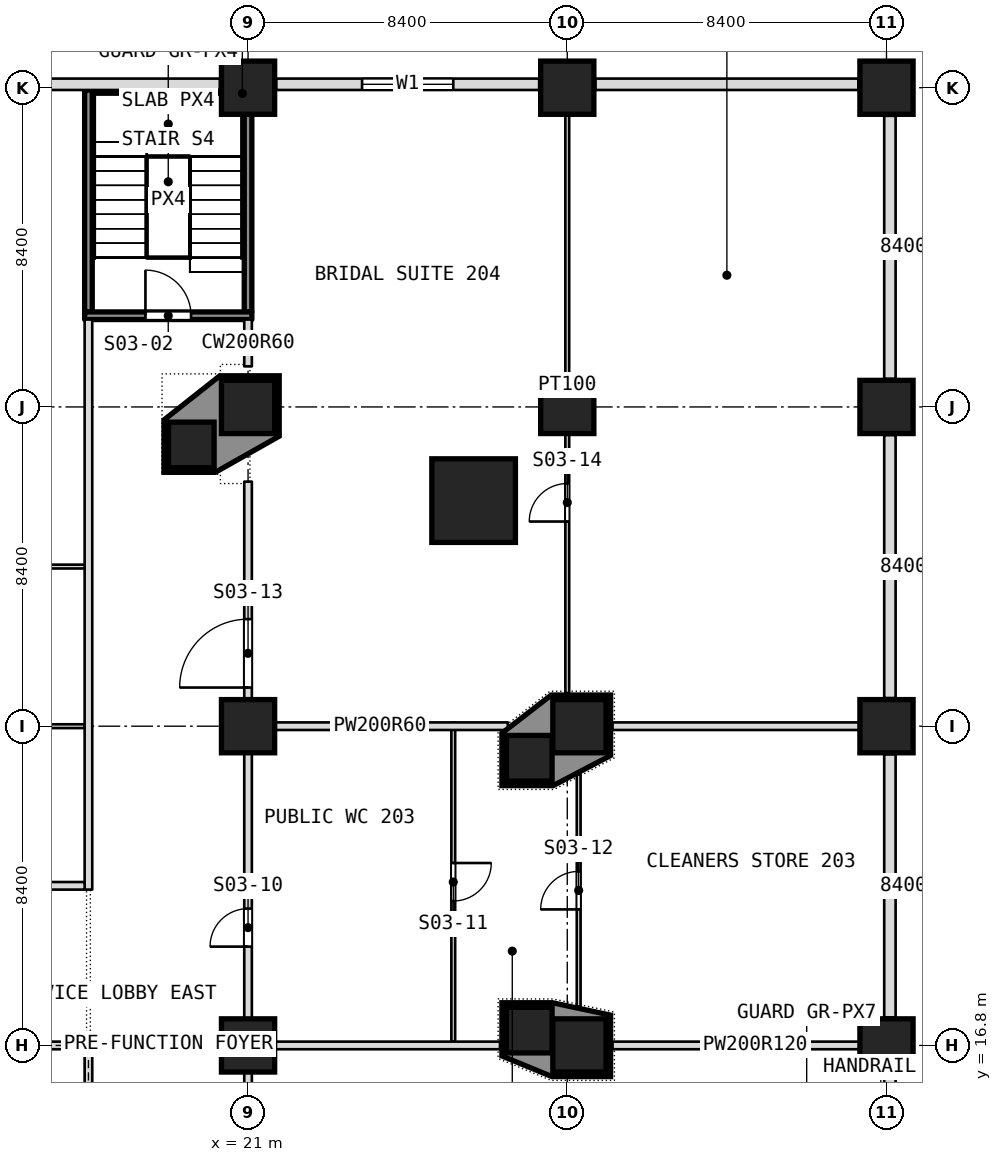
"""IFC4 building model, lengths in metres.
Left out: names, types, materials, properties, quantities, classifications, styles, units other than length and angle.
Written with IfcOpenShell. Run it as: python <this file> out.ifc"""

import sys

from ifc_helpers import new_model, si_unit, direction, frame, frame_2d, origin, origin_2d, place, context, subcontext, project, spatial, polyline, rectangle, outline, extrude, element, fill, save


model = new_model("IFC4")
c1 = context("Model", 3, precision=1e-05, world=origin(), true_north=direction((0.0, 1.0)))
c2 = subcontext(c1, "Body", "Model", "MODEL_VIEW")
j1 = project(units=[si_unit("LENGTHUNIT", "METRE"), si_unit("PLANEANGLEUNIT", "RADIAN")], contexts=[c1])
p1 = place(None, origin())
s1 = spatial("IfcSite", under=j1, at=p1, CompositionType="ELEMENT")
p2 = place(p1, origin())
s2 = spatial("IfcBuilding", under=s1, at=p2, CompositionType="ELEMENT")
p3 = place(p2, frame((0.0, 0.0, 13.0)))
s3 = spatial("IfcBuildingStorey", under=s2, at=p3, CompositionType="ELEMENT", Elevation=13.0)
for number, where, z_axis, x_axis in (
    (1, (21.0, 16.8, 0.0), (0.0, 0.0, 1.0), (1.0, 0.0, 0.0)),
    (2, (29.72, 16.8, 0.0), (0.0, 0.0, 1.0), (1.0, 0.0, 0.0)),
    (3, (37.8, 16.8, 0.0), (0.0, 0.0, 1.0), (1.0, 0.0, 0.0)),
    (4, (21.0, 25.2, 0.0), (0.0, 0.0, 1.0), (1.0, 0.0, 0.0)),
    (5, (29.72, 25.2, 0.0), (0.0, 0.0, 1.0), (1.0, 0.0, 0.0)),
    (6, (37.8, 25.2, 0.0), (0.0, 0.0, 1.0), (1.0, 0.0, 0.0)),
    (7, (21.0, 33.6, 0.0), (0.0, 0.0, 1.0), (1.0, 0.0, 0.0)),
    (8, (29.4, 33.6, 0.0), (0.0, 0.0, 1.0), (1.0, 0.0, 0.0)),
    (9, (37.8, 33.6, 0.0), (0.0, 0.0, 1.0), (1.0, 0.0, 0.0)),
    (10, (21.0, 42.0, 0.0), (0.0, 0.0, 1.0), (1.0, 0.0, 0.0)),
    (11, (29.4, 42.0, 0.0), (0.0, 0.0, 1.0), (1.0, 0.0, 0.0)),
    (12, (37.8, 42.0, 0.0), (0.0, 0.0, 1.0), (1.0, 0.0, 0.0)),
):
    element("IfcColumn", number, at=place(p3, frame(where, z_axis=z_axis, x_axis=x_axis)), inside=s3, PredefinedType="COLUMN", context=c2, shape_type="SweptSolid", body=[
        extrude(rectangle(XDim=1.4, YDim=1.4, at=origin_2d()), origin(), (0.0, 0.0, 1.0), 8.0),
    ])
p4 = place(p3, frame((26.936, 31.135, 0.0), z_axis=(0.0, 0.0, 1.0), x_axis=(1.0, 0.0, 0.0)))
e13 = element("IfcColumn", 13, at=p4, inside=s3, PredefinedType="COLUMN", context=c2, shape_type="SweptSolid", body=[
    extrude(rectangle(XDim=2.2, YDim=2.2, at=origin_2d()), origin(), (0.0, 0.0, 1.0), 8.0),
])
for number, where, z_axis, x_axis in (
    (14, (19.507, 32.6, 0.0), (0.0, 0.0, 1.0), (1.0, 0.0, 0.0)),
    (15, (28.4, 24.356, 0.0), (0.0, 0.0, 1.0), (1.0, 0.0, 0.0)),
    (16, (28.4, 17.203, 0.0), (0.0, 0.0, 1.0), (1.0, 0.0, 0.0)),
):
    element("IfcColumn", number, at=place(p3, frame(where, z_axis=z_axis, x_axis=x_axis)), inside=s3, PredefinedType="COLUMN", context=c2, shape_type="SweptSolid", body=[
        extrude(rectangle(XDim=1.2, YDim=1.2, at=origin_2d()), origin(), (0.0, 0.0, 1.0), 8.0),
    ])
p5 = place(p3, frame((29.7, 17.828, 0.0), z_axis=(0.0, 0.0, 1.0), x_axis=(0.0, 1.0, 0.0)))
e17 = element("IfcWall", 17, at=p5, inside=s3, PredefinedType="PARTITIONING", context=c2, shape_type="SweptSolid", body=[
    extrude(rectangle(XDim=6.103, YDim=0.1, at=frame_2d((3.052, 0.0))), origin(), (0.0, 0.0, 1.0), 7.68),
])
p6 = place(p5, frame((2.551, 0.0, 0.0)))
e18 = element("IfcOpeningElement", 18, at=p6, cuts=e17, PredefinedType="OPENING", context=c2, shape_type="SweptSolid", body=[
    extrude(rectangle(XDim=1.0, YDim=2.1, at=frame_2d((0.5, 1.05))), frame((0.0, 0.05, 0.0), z_axis=(0.0, -1.0, 0.0), x_axis=(1.0, 0.0, 0.0)), (0.0, 0.0, 1.0), 0.1),
])
p7 = place(p3, frame((29.4, 26.07, 0.0), z_axis=(0.0, 0.0, 1.0), x_axis=(0.0, 1.0, 0.0)))
e19 = element("IfcWall", 19, at=p7, inside=s3, PredefinedType="PARTITIONING", context=c2, shape_type="SweptSolid", body=[
    extrude(rectangle(XDim=16.23, YDim=0.1, at=frame_2d((8.115, 0.0))), origin(), (0.0, 0.0, 1.0), 7.68),
])
p8 = place(p7, frame((4.515, 0.0, 0.0)))
e20 = element("IfcOpeningElement", 20, at=p8, cuts=e19, PredefinedType="OPENING", context=c2, shape_type="SweptSolid", body=[
    extrude(rectangle(XDim=1.0, YDim=2.1, at=frame_2d((0.5, 1.05))), frame((0.0, 0.05, 0.0), z_axis=(0.0, -1.0, 0.0), x_axis=(1.0, 0.0, 0.0)), (0.0, 0.0, 1.0), 0.1),
])
p9 = place(p3, frame((26.4, 16.9, 0.0), z_axis=(0.0, 0.0, 1.0), x_axis=(0.0, 1.0, 0.0)))
e21 = element("IfcWall", 21, at=p9, inside=s3, PredefinedType="PARTITIONING", context=c2, shape_type="SweptSolid", body=[
    extrude(rectangle(XDim=8.4, YDim=0.1, at=frame_2d((4.2, 0.0))), origin(), (0.0, 0.0, 1.0), 7.68),
])
p10 = place(p9, frame((3.7, 0.0, 0.0)))
e22 = element("IfcOpeningElement", 22, at=p10, cuts=e21, PredefinedType="OPENING", context=c2, shape_type="SweptSolid", body=[
    extrude(rectangle(XDim=1.0, YDim=2.1, at=frame_2d((0.5, 1.05))), frame((0.0, 0.05, 0.0), z_axis=(0.0, -1.0, 0.0), x_axis=(1.0, 0.0, 0.0)), (0.0, 0.0, 1.0), 0.1),
])
p11 = place(p3, frame((21.0, 9.5, 0.0), z_axis=(0.0, 0.0, 1.0), x_axis=(0.0, 1.0, 0.0)))
e23 = element("IfcWall", 23, at=p11, inside=s3, PredefinedType="PARTITIONING", context=c2, shape_type="SweptSolid", body=[
    extrude(rectangle(XDim=22.135, YDim=0.2, at=frame_2d((11.067, 0.0))), origin(), (0.0, 0.0, 1.0), 7.68),
])
p12 = place(p11, frame((9.9, 0.0, 0.0)))
e24 = element("IfcOpeningElement", 24, at=p12, cuts=e23, PredefinedType="OPENING", context=c2, shape_type="SweptSolid", body=[
    extrude(rectangle(XDim=1.0, YDim=2.1, at=frame_2d((0.5, 1.05))), frame((0.0, 0.1, 0.0), z_axis=(0.0, -1.0, 0.0), x_axis=(1.0, 0.0, 0.0)), (0.0, 0.0, 1.0), 0.2),
])
p13 = place(p11, frame((16.717, 0.0, 0.0)))
e25 = element("IfcOpeningElement", 25, at=p13, cuts=e23, PredefinedType="OPENING", context=c2, shape_type="SweptSolid", body=[
    extrude(rectangle(XDim=1.8, YDim=2.1, at=frame_2d((0.9, 1.05))), frame((0.0, 0.1, 0.0), z_axis=(0.0, -1.0, 0.0), x_axis=(1.0, 0.0, 0.0)), (0.0, 0.0, 1.0), 0.2),
])
p14 = place(p3, frame((21.0, 34.668, 0.0), z_axis=(0.0, 0.0, 1.0), x_axis=(0.0, 1.0, 0.0)))
e26 = element("IfcWall", 26, at=p14, inside=s3, PredefinedType="PARTITIONING", context=c2, shape_type="SweptSolid", body=[
    extrude(rectangle(XDim=1.232, YDim=0.2, at=frame_2d((0.616, 0.0))), origin(), (0.0, 0.0, 1.0), 7.68),
])
p15 = place(p3, frame((21.0, 36.1, 0.0), z_axis=(0.0, 0.0, 1.0), x_axis=(0.0, 1.0, 0.0)))
e27 = element("IfcWall", 27, at=p15, inside=s3, PredefinedType="PARTITIONING", context=c2, shape_type="SweptSolid", body=[
    extrude(rectangle(XDim=6.2, YDim=0.2, at=frame_2d((3.1, 0.0))), origin(), (0.0, 0.0, 1.0), 7.68),
])
p16 = place(p3, frame((16.8, 20.9, 0.0), z_axis=(0.0, 0.0, 1.0), x_axis=(0.0, 1.0, 0.0)))
e28 = element("IfcWall", 28, at=p16, inside=s3, PredefinedType="PARTITIONING", context=c2, shape_type="SweptSolid", body=[
    extrude(rectangle(XDim=15.0, YDim=0.2, at=frame_2d((7.5, 0.0))), origin(), (0.0, 0.0, 1.0), 7.68),
])
p17 = place(p3, frame((16.8, 36.1, 0.0), z_axis=(0.0, 0.0, 1.0), x_axis=(0.0, 1.0, 0.0)))
e29 = element("IfcWall", 29, at=p17, inside=s3, PredefinedType="PARTITIONING", context=c2, shape_type="SweptSolid", body=[
    extrude(rectangle(XDim=5.84, YDim=0.2, at=frame_2d((2.92, 0.0))), origin(), (0.0, 0.0, 1.0), 7.68),
])
p18 = place(p3, frame((21.1, 16.8, 0.0), z_axis=(0.0, 0.0, 1.0), x_axis=(1.0, 0.0, 0.0)))
e30 = element("IfcWall", 30, at=p18, inside=s3, PredefinedType="PARTITIONING", context=c2, shape_type="SweptSolid", body=[
    extrude(rectangle(XDim=6.53, YDim=0.2, at=frame_2d((3.265, 0.0))), origin(), (0.0, 0.0, 1.0), 7.68),
])
p19 = place(p3, frame((30.59, 16.8, 0.0), z_axis=(0.0, 0.0, 1.0), x_axis=(1.0, 0.0, 0.0)))
e31 = element("IfcWall", 31, at=p19, inside=s3, PredefinedType="PARTITIONING", context=c2, shape_type="SweptSolid", body=[
    extrude(rectangle(XDim=7.51, YDim=0.2, at=frame_2d((3.755, 0.0))), origin(), (0.0, 0.0, 1.0), 7.68),
])
p20 = place(p3, frame((-16.7, 21.0, 0.0), z_axis=(0.0, 0.0, 1.0), x_axis=(1.0, 0.0, 0.0)))
e32 = element("IfcWall", 32, at=p20, inside=s3, PredefinedType="PARTITIONING", context=c2, shape_type="SweptSolid", body=[
    extrude(rectangle(XDim=33.4, YDim=0.2, at=frame_2d((16.7, 0.0))), origin(), (0.0, 0.0, 1.0), 7.68),
])
p21 = place(p20, frame((15.8, 0.0, 0.0)))
e33 = element("IfcOpeningElement", 33, at=p21, cuts=e32, PredefinedType="OPENING", context=c2, shape_type="SweptSolid", body=[
    extrude(rectangle(XDim=1.8, YDim=2.1, at=frame_2d((0.9, 1.05))), frame((0.0, 0.1, 0.0), z_axis=(0.0, -1.0, 0.0), x_axis=(1.0, 0.0, 0.0)), (0.0, 0.0, 1.0), 0.2),
])
p22 = place(p3, frame((13.32, 25.2, 0.0), z_axis=(0.0, 0.0, 1.0), x_axis=(1.0, 0.0, 0.0)))
e34 = element("IfcWall", 34, at=p22, inside=s3, PredefinedType="PARTITIONING", context=c2, shape_type="SweptSolid", body=[
    extrude(rectangle(XDim=3.38, YDim=0.1, at=frame_2d((1.69, 0.0))), origin(), (0.0, 0.0, 1.0), 7.68),
])
p23 = place(p3, frame((21.1, 25.2, 0.0), z_axis=(0.0, 0.0, 1.0), x_axis=(1.0, 0.0, 0.0)))
e35 = element("IfcWall", 35, at=p23, inside=s3, PredefinedType="PARTITIONING", context=c2, shape_type="SweptSolid", body=[
    extrude(rectangle(XDim=6.737, YDim=0.2, at=frame_2d((3.368, 0.0))), origin(), (0.0, 0.0, 1.0), 7.68),
])
p24 = place(p3, frame((30.59, 25.2, 0.0), z_axis=(0.0, 0.0, 1.0), x_axis=(1.0, 0.0, 0.0)))
e36 = element("IfcWall", 36, at=p24, inside=s3, PredefinedType="PARTITIONING", context=c2, shape_type="SweptSolid", body=[
    extrude(rectangle(XDim=7.51, YDim=0.2, at=frame_2d((3.755, 0.0))), origin(), (0.0, 0.0, 1.0), 7.68),
])
p25 = place(p3, frame((-16.7, 29.4, 0.0), z_axis=(0.0, 0.0, 1.0), x_axis=(1.0, 0.0, 0.0)))
e37 = element("IfcWall", 37, at=p25, inside=s3, PredefinedType="PARTITIONING", context=c2, shape_type="SweptSolid", body=[
    extrude(rectangle(XDim=33.4, YDim=0.1, at=frame_2d((16.7, 0.0))), origin(), (0.0, 0.0, 1.0), 7.68),
])
p26 = place(p25, frame((16.2, 0.0, 0.0)))
e38 = element("IfcOpeningElement", 38, at=p26, cuts=e37, PredefinedType="OPENING", context=c2, shape_type="SweptSolid", body=[
    extrude(rectangle(XDim=1.0, YDim=2.1, at=frame_2d((0.5, 1.05))), frame((0.0, 0.05, 0.0), z_axis=(0.0, -1.0, 0.0), x_axis=(1.0, 0.0, 0.0)), (0.0, 0.0, 1.0), 0.1),
])
p27 = place(p3, frame((16.7, 36.0, 0.0), z_axis=(0.0, 0.0, 1.0), x_axis=(1.0, 0.0, 0.0)))
e39 = element("IfcWall", 39, at=p27, inside=s3, PredefinedType="PARTITIONING", context=c2, shape_type="SweptSolid", body=[
    extrude(rectangle(XDim=4.4, YDim=0.2, at=frame_2d((2.2, 0.0))), origin(), (0.0, 0.0, 1.0), 7.68),
])
p28 = place(p27, frame((1.6, 0.0, 0.0)))
e40 = element("IfcOpeningElement", 40, at=p28, cuts=e39, PredefinedType="OPENING", context=c2, shape_type="SweptSolid", body=[
    extrude(rectangle(XDim=1.2, YDim=2.1, at=frame_2d((0.6, 1.05))), frame((0.0, 0.1, 0.0), z_axis=(0.0, -1.0, 0.0), x_axis=(1.0, 0.0, 0.0)), (0.0, 0.0, 1.0), 0.2),
])
p29 = place(p3, frame((37.89, 9.14, 0.0), z_axis=(0.0, 0.0, 1.0), x_axis=(0.0, 1.0, 0.0)))
e41 = element("IfcWall", 41, at=p29, inside=s3, PredefinedType="NOTDEFINED", context=c2, shape_type="SweptSolid", body=[
    extrude(rectangle(XDim=6.92, YDim=0.3, at=frame_2d((3.46, 0.0))), origin(), (0.0, 0.0, 1.0), 8.0),
])
p30 = place(p3, frame((37.89, 17.54, 0.0), z_axis=(0.0, 0.0, 1.0), x_axis=(0.0, 1.0, 0.0)))
e42 = element("IfcWall", 42, at=p30, inside=s3, PredefinedType="NOTDEFINED", context=c2, shape_type="SweptSolid", body=[
    extrude(rectangle(XDim=6.92, YDim=0.3, at=frame_2d((3.46, 0.0))), origin(), (0.0, 0.0, 1.0), 6.78),
])
p31 = place(p3, frame((37.89, 25.94, 0.0), z_axis=(0.0, 0.0, 1.0), x_axis=(0.0, 1.0, 0.0)))
e43 = element("IfcWall", 43, at=p31, inside=s3, PredefinedType="NOTDEFINED", context=c2, shape_type="SweptSolid", body=[
    extrude(rectangle(XDim=6.92, YDim=0.3, at=frame_2d((3.46, 0.0))), origin(), (0.0, 0.0, 1.0), 6.78),
])
p32 = place(p3, frame((37.89, 34.34, 0.0), z_axis=(0.0, 0.0, 1.0), x_axis=(0.0, 1.0, 0.0)))
e44 = element("IfcWall", 44, at=p32, inside=s3, PredefinedType="NOTDEFINED", context=c2, shape_type="SweptSolid", body=[
    extrude(rectangle(XDim=6.92, YDim=0.3, at=frame_2d((3.46, 0.0))), origin(), (0.0, 0.0, 1.0), 6.78),
])
p33 = place(p3, frame((37.06, 42.09, 0.0), z_axis=(0.0, 0.0, 1.0), x_axis=(-1.0, 0.0, 0.0)))
e45 = element("IfcWall", 45, at=p33, inside=s3, PredefinedType="NOTDEFINED", context=c2, shape_type="SweptSolid", body=[
    extrude(rectangle(XDim=6.92, YDim=0.3, at=frame_2d((3.46, 0.0))), origin(), (0.0, 0.0, 1.0), 6.78),
])
p34 = place(p3, frame((28.66, 42.09, 0.0), z_axis=(0.0, 0.0, 1.0), x_axis=(-1.0, 0.0, 0.0)))
e46 = element("IfcWall", 46, at=p34, inside=s3, PredefinedType="NOTDEFINED", context=c2, shape_type="SweptSolid", body=[
    extrude(rectangle(XDim=6.92, YDim=0.3, at=frame_2d((3.46, 0.0))), origin(), (0.0, 0.0, 1.0), 6.78),
])
p35 = place(p34, frame((2.26, 0.0, 0.9)))
e47 = element("IfcOpeningElement", 47, at=p35, cuts=e46, PredefinedType="OPENING", context=c2, shape_type="SweptSolid", body=[
    extrude(rectangle(XDim=2.4, YDim=2.1, at=frame_2d((1.2, 1.05))), frame((0.0, 0.15, 0.0), z_axis=(0.0, -1.0, 0.0), x_axis=(1.0, 0.0, 0.0)), (0.0, 0.0, 1.0), 0.3),
])
p36 = place(p3, frame((20.26, 42.09, 0.0), z_axis=(0.0, 0.0, 1.0), x_axis=(-1.0, 0.0, 0.0)))
e48 = element("IfcWall", 48, at=p36, inside=s3, PredefinedType="NOTDEFINED", context=c2, shape_type="SweptSolid", body=[
    extrude(rectangle(XDim=6.92, YDim=0.3, at=frame_2d((3.46, 0.0))), origin(), (0.0, 0.0, 1.0), 6.78),
])
p37 = place(p3, frame((16.8, -0.1, 0.0), z_axis=(0.0, 0.0, 1.0), x_axis=(0.0, 1.0, 0.0)))
e49 = element("IfcWall", 49, at=p37, inside=s3, PredefinedType="PARTITIONING", context=c2, shape_type="SweptSolid", body=[
    extrude(rectangle(XDim=17.0, YDim=0.2, at=frame_2d((8.5, 0.0))), origin(), (0.0, 0.0, 1.0), 7.78),
])
p38 = place(p37, frame((1.9, 0.0, 0.0)))
e50 = element("IfcOpeningElement", 50, at=p38, cuts=e49, PredefinedType="OPENING", context=c2, shape_type="SweptSolid", body=[
    extrude(rectangle(XDim=2.4, YDim=2.1, at=frame_2d((1.2, 1.05))), frame((0.0, 0.1, 0.0), z_axis=(0.0, -1.0, 0.0), x_axis=(1.0, 0.0, 0.0)), (0.0, 0.0, 1.0), 0.2),
])
p39 = place(p37, frame((12.7, 0.0, 0.0)))
e51 = element("IfcOpeningElement", 51, at=p39, cuts=e49, PredefinedType="OPENING", context=c2, shape_type="SweptSolid", body=[
    extrude(rectangle(XDim=2.4, YDim=2.1, at=frame_2d((1.2, 1.05))), frame((0.0, 0.1, 0.0), z_axis=(0.0, -1.0, 0.0), x_axis=(1.0, 0.0, 0.0)), (0.0, 0.0, 1.0), 0.2),
])
p40 = place(p3, frame((12.6, 16.8, 0.0), z_axis=(0.0, 0.0, 1.0), x_axis=(1.0, 0.0, 0.0)))
e52 = element("IfcWall", 52, at=p40, inside=s3, PredefinedType="PARTITIONING", context=c2, shape_type="SweptSolid", body=[
    extrude(rectangle(XDim=4.1, YDim=0.2, at=frame_2d((2.05, 0.0))), origin(), (0.0, 0.0, 1.0), 7.78),
])
p41 = place(p3, origin())
e53 = element("IfcWall", 53, at=p41, inside=s3, PredefinedType="SOLIDWALL", context=c2, shape_type="SweptSolid", body=[
    extrude(outline(polyline([(20.258, 34.42), (21.82, 34.42), (21.82, 32.83), (20.138, 31.88), (18.787, 31.88), (18.787, 33.258), (20.258, 34.42)]), holes=[polyline([(21.7, 32.9), (21.7, 34.3), (20.3, 34.3), (20.3, 32.9), (21.7, 32.9)]), polyline([(20.107, 32.0), (20.107, 33.2), (18.907, 33.2), (18.907, 32.0), (20.107, 32.0)])]), origin(), (0.0, 0.0, 1.0), 8.0),
])
p42 = place(p3, origin())
e54 = element("IfcWall", 54, at=p42, inside=s3, PredefinedType="SOLIDWALL", context=c2, shape_type="SweptSolid", body=[
    extrude(outline(polyline([(27.68, 25.015), (28.979, 26.02), (30.54, 26.02), (30.54, 24.427), (29.03, 23.636), (27.68, 23.636), (27.68, 25.015)]), holes=[polyline([(29.02, 24.5), (30.42, 24.5), (30.42, 25.9), (29.02, 25.9), (29.02, 24.5)]), polyline([(27.8, 23.756), (29.0, 23.756), (29.0, 24.956), (27.8, 24.956), (27.8, 23.756)])]), origin(), (0.0, 0.0, 1.0), 8.0),
])
p43 = place(p3, origin())
e55 = element("IfcWall", 55, at=p43, inside=s3, PredefinedType="SOLIDWALL", context=c2, shape_type="SweptSolid", body=[
    extrude(outline(polyline([(27.68, 16.523), (27.68, 17.923), (29.013, 17.923), (30.54, 17.597), (30.54, 15.98), (28.996, 15.98), (27.68, 16.523)]), holes=[polyline([(29.02, 16.1), (30.42, 16.1), (30.42, 17.5), (29.02, 17.5), (29.02, 16.1)]), polyline([(27.8, 16.603), (29.0, 16.603), (29.0, 17.803), (27.8, 17.803), (27.8, 16.603)])]), origin(), (0.0, 0.0, 1.0), 8.0),
])
p44 = place(p28, origin())
e56 = element("IfcDoor", 56, at=p44, inside=s3, OperationType="SINGLE_SWING_LEFT", PredefinedType="DOOR", context=c2, shape_type="SweptSolid", body=[
    extrude(rectangle(XDim=1.2, YDim=2.1, at=frame_2d((0.6, 1.05))), frame((0.0, 0.025, 0.0), z_axis=(0.0, -1.0, 0.0), x_axis=(1.0, 0.0, 0.0)), (0.0, 0.0, 1.0), 0.05),
])
fill(e40, e56)
p45 = place(p12, origin())
e57 = element("IfcDoor", 57, at=p45, inside=s3, OperationType="SINGLE_SWING_RIGHT", PredefinedType="DOOR", context=c2, shape_type="SweptSolid", body=[
    extrude(rectangle(XDim=1.0, YDim=2.1, at=frame_2d((0.5, 1.05))), frame((0.0, 0.025, 0.0), z_axis=(0.0, -1.0, 0.0), x_axis=(1.0, 0.0, 0.0)), (0.0, 0.0, 1.0), 0.05),
])
fill(e24, e57)
p46 = place(p10, origin())
e58 = element("IfcDoor", 58, at=p46, inside=s3, OperationType="SINGLE_SWING_LEFT", PredefinedType="DOOR", context=c2, shape_type="SweptSolid", body=[
    extrude(rectangle(XDim=1.0, YDim=2.1, at=frame_2d((0.5, 1.05))), frame((0.0, 0.025, 0.0), z_axis=(0.0, -1.0, 0.0), x_axis=(1.0, 0.0, 0.0)), (0.0, 0.0, 1.0), 0.05),
])
fill(e22, e58)
p47 = place(p6, origin())
e59 = element("IfcDoor", 59, at=p47, inside=s3, OperationType="SINGLE_SWING_LEFT", PredefinedType="DOOR", context=c2, shape_type="SweptSolid", body=[
    extrude(rectangle(XDim=1.0, YDim=2.1, at=frame_2d((0.5, 1.05))), frame((0.0, 0.025, 0.0), z_axis=(0.0, -1.0, 0.0), x_axis=(1.0, 0.0, 0.0)), (0.0, 0.0, 1.0), 0.05),
])
fill(e18, e59)
p48 = place(p13, origin())
e60 = element("IfcDoor", 60, at=p48, inside=s3, OperationType="DOUBLE_DOOR_SINGLE_SWING", PredefinedType="DOOR", context=c2, shape_type="SweptSolid", body=[
    extrude(rectangle(XDim=1.8, YDim=2.1, at=frame_2d((0.9, 1.05))), frame((0.0, 0.025, 0.0), z_axis=(0.0, -1.0, 0.0), x_axis=(1.0, 0.0, 0.0)), (0.0, 0.0, 1.0), 0.05),
])
fill(e25, e60)
p49 = place(p8, origin())
e61 = element("IfcDoor", 61, at=p49, inside=s3, OperationType="SINGLE_SWING_RIGHT", PredefinedType="DOOR", context=c2, shape_type="SweptSolid", body=[
    extrude(rectangle(XDim=1.0, YDim=2.1, at=frame_2d((0.5, 1.05))), frame((0.0, 0.025, 0.0), z_axis=(0.0, -1.0, 0.0), x_axis=(1.0, 0.0, 0.0)), (0.0, 0.0, 1.0), 0.05),
])
fill(e20, e61)
p50 = place(p35, origin())
e62 = element("IfcWindow", 62, at=p50, inside=s3, PartitioningType="SINGLE_PANEL", PredefinedType="WINDOW", context=c2, shape_type="SweptSolid", body=[
    extrude(rectangle(XDim=2.4, YDim=2.1, at=frame_2d((1.2, 1.05))), frame((0.0, 0.03, 0.0), z_axis=(0.0, -1.0, 0.0), x_axis=(1.0, 0.0, 0.0)), (0.0, 0.0, 1.0), 0.06),
])
fill(e47, e62)
save(model, sys.argv[1])
